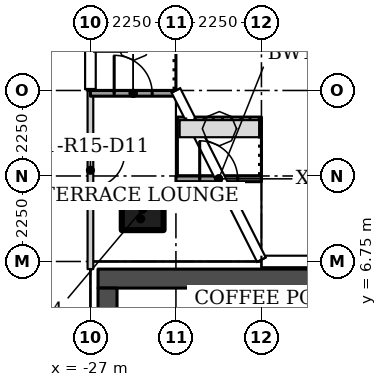
"""IFC4 building model, lengths in metres.
Left out: names, types, materials, properties, quantities, classifications, styles, units other than length and angle.
Written with IfcOpenShell. Run it as: python <this file> out.ifc"""

import sys

from ifc_helpers import new_model, si_unit, direction, frame, frame_2d, origin, origin_2d, place, context, subcontext, project, spatial, rectangle, hollow_rectangle, extrude, element, fill, save


model = new_model("IFC4")
c1 = context("Model", 3, precision=1e-05, world=origin(), true_north=direction((0.0, 1.0)))
c2 = subcontext(c1, "Body", "Model", "MODEL_VIEW")
j1 = project(units=[si_unit("LENGTHUNIT", "METRE"), si_unit("PLANEANGLEUNIT", "RADIAN")], contexts=[c1])
p1 = place(None, origin())
s1 = spatial("IfcSite", under=j1, at=p1, CompositionType="ELEMENT")
p2 = place(p1, origin())
s2 = spatial("IfcBuilding", under=s1, at=p2, CompositionType="ELEMENT")
p3 = place(p2, frame((0.0, 0.0, 142.8)))
s3 = spatial("IfcBuildingStorey", under=s2, at=p3, CompositionType="ELEMENT", Elevation=142.8)
p4 = place(p3, frame((-25.625, 8.125, 0.0)))
e1 = element("IfcColumn", 1, at=p4, inside=s3, PredefinedType="COLUMN", context=c2, shape_type="SweptSolid", body=[
    extrude(hollow_rectangle(XDim=1.1, YDim=1.1, WallThickness=0.04, at=origin_2d()), origin(), (0.0, 0.0, 1.0), 3.55),
])
p5 = place(p3, frame((-27.0, 11.25, 0.0), z_axis=(0.0, 0.0, 1.0), x_axis=(0.0, -1.0, 0.0)))
e2 = element("IfcWall", 2, at=p5, inside=s3, PredefinedType="PARTITIONING", context=c2, shape_type="SweptSolid", body=[
    extrude(rectangle(XDim=4.7, YDim=0.15, at=frame_2d((2.35, 0.0))), origin(), (0.0, 0.0, 1.0), 3.55),
])
p6 = place(p5, frame((1.65, 0.0, 0.0)))
e3 = element("IfcOpeningElement", 3, at=p6, cuts=e2, PredefinedType="OPENING", context=c2, shape_type="SweptSolid", body=[
    extrude(rectangle(XDim=0.9, YDim=2.1, at=frame_2d((0.45, 1.05))), frame((0.0, 0.085, 0.0), z_axis=(0.0, -1.0, 0.0), x_axis=(1.0, 0.0, 0.0)), (0.0, 0.0, 1.0), 0.17),
])
p7 = place(p3, frame((-24.75, 8.925, 0.0)))
e4 = element("IfcWall", 4, at=p7, inside=s3, PredefinedType="SOLIDWALL", context=c2, shape_type="SweptSolid", body=[
    extrude(rectangle(XDim=2.25, YDim=0.15, at=frame_2d((1.125, 0.0))), origin(), (0.0, 0.0, 1.0), 3.45),
])
p8 = place(p7, frame((0.625, 0.0, 0.0)))
e5 = element("IfcOpeningElement", 5, at=p8, cuts=e4, PredefinedType="OPENING", context=c2, shape_type="SweptSolid", body=[
    extrude(rectangle(XDim=1.0, YDim=2.4, at=frame_2d((0.5, 1.2))), frame((0.0, 0.085, 0.0), z_axis=(0.0, -1.0, 0.0), x_axis=(1.0, 0.0, 0.0)), (0.0, 0.0, 1.0), 0.17),
])
p9 = place(p3, frame((-27.0, 11.175, 0.0)))
e6 = element("IfcWall", 6, at=p9, inside=s3, PredefinedType="SOLIDWALL", context=c2, shape_type="SweptSolid", body=[
    extrude(rectangle(XDim=2.25, YDim=0.15, at=frame_2d((1.125, 0.0))), origin(), (0.0, 0.0, 1.0), 3.45),
])
p10 = place(p9, frame((0.625, 0.0, 0.0)))
e7 = element("IfcOpeningElement", 7, at=p10, cuts=e6, PredefinedType="OPENING", context=c2, shape_type="SweptSolid", body=[
    extrude(rectangle(XDim=1.0, YDim=2.4, at=frame_2d((0.5, 1.2))), frame((0.0, 0.085, 0.0), z_axis=(0.0, -1.0, 0.0), x_axis=(1.0, 0.0, 0.0)), (0.0, 0.0, 1.0), 0.17),
])
p11 = place(p3, frame((-26.8, 6.3, 0.0)))
e8 = element("IfcWall", 8, at=p11, inside=s3, PredefinedType="SHEAR", context=c2, shape_type="SweptSolid", body=[
    extrude(rectangle(XDim=13.1, YDim=0.5, at=frame_2d((6.55, 0.0))), origin(), (0.0, 0.0, 1.0), 3.55),
])
p12 = place(p3, frame((-26.55, 6.05, 0.0), z_axis=(0.0, 0.0, 1.0), x_axis=(0.0, -1.0, 0.0)))
e9 = element("IfcWall", 9, at=p12, inside=s3, PredefinedType="SHEAR", context=c2, shape_type="SweptSolid", body=[
    extrude(rectangle(XDim=12.1, YDim=0.5, at=frame_2d((6.05, 0.0))), origin(), (0.0, 0.0, 1.0), 3.55),
])
p13 = place(p12, frame((3.9, 0.0, 0.0)))
e10 = element("IfcOpeningElement", 10, at=p13, cuts=e9, PredefinedType="OPENING", context=c2, shape_type="SweptSolid", body=[
    extrude(rectangle(XDim=1.8, YDim=2.4, at=frame_2d((0.9, 1.2))), frame((0.0, 0.26, 0.0), z_axis=(0.0, -1.0, 0.0), x_axis=(1.0, 0.0, 0.0)), (0.0, 0.0, 1.0), 0.52),
])
p14 = place(p3, frame((-24.0, 3.25, 0.0), z_axis=(0.0, 0.0, 1.0), x_axis=(0.0, 1.0, 0.0)))
e11 = element("IfcWall", 11, at=p14, inside=s3, PredefinedType="PARTITIONING", context=c2, shape_type="SweptSolid", body=[
    extrude(rectangle(XDim=2.8, YDim=0.15, at=frame_2d((1.4, 0.0))), origin(), (0.0, 0.0, 1.0), 3.55),
])
p15 = place(p6, origin())
e12 = element("IfcDoor", 12, at=p15, inside=s3, OperationType="SINGLE_SWING_RIGHT", PredefinedType="DOOR", context=c2, shape_type="SweptSolid", body=[
    extrude(rectangle(XDim=0.9, YDim=2.1, at=frame_2d((0.45, 1.05))), frame((0.0, 0.025, 0.0), z_axis=(0.0, -1.0, 0.0), x_axis=(1.0, 0.0, 0.0)), (0.0, 0.0, 1.0), 0.05),
])
fill(e3, e12)
p16 = place(p8, origin())
e13 = element("IfcDoor", 13, at=p16, inside=s3, OperationType="SINGLE_SWING_RIGHT", PredefinedType="DOOR", context=c2, shape_type="SweptSolid", body=[
    extrude(rectangle(XDim=1.0, YDim=2.4, at=frame_2d((0.5, 1.2))), frame((0.0, 0.025, 0.0), z_axis=(0.0, -1.0, 0.0), x_axis=(1.0, 0.0, 0.0)), (0.0, 0.0, 1.0), 0.05),
])
fill(e5, e13)
p17 = place(p10, origin())
e14 = element("IfcDoor", 14, at=p17, inside=s3, OperationType="SINGLE_SWING_LEFT", PredefinedType="DOOR", context=c2, shape_type="SweptSolid", body=[
    extrude(rectangle(XDim=1.0, YDim=2.4, at=frame_2d((0.5, 1.2))), frame((0.0, 0.025, 0.0), z_axis=(0.0, -1.0, 0.0), x_axis=(1.0, 0.0, 0.0)), (0.0, 0.0, 1.0), 0.05),
])
fill(e7, e14)
save(model, sys.argv[1])
